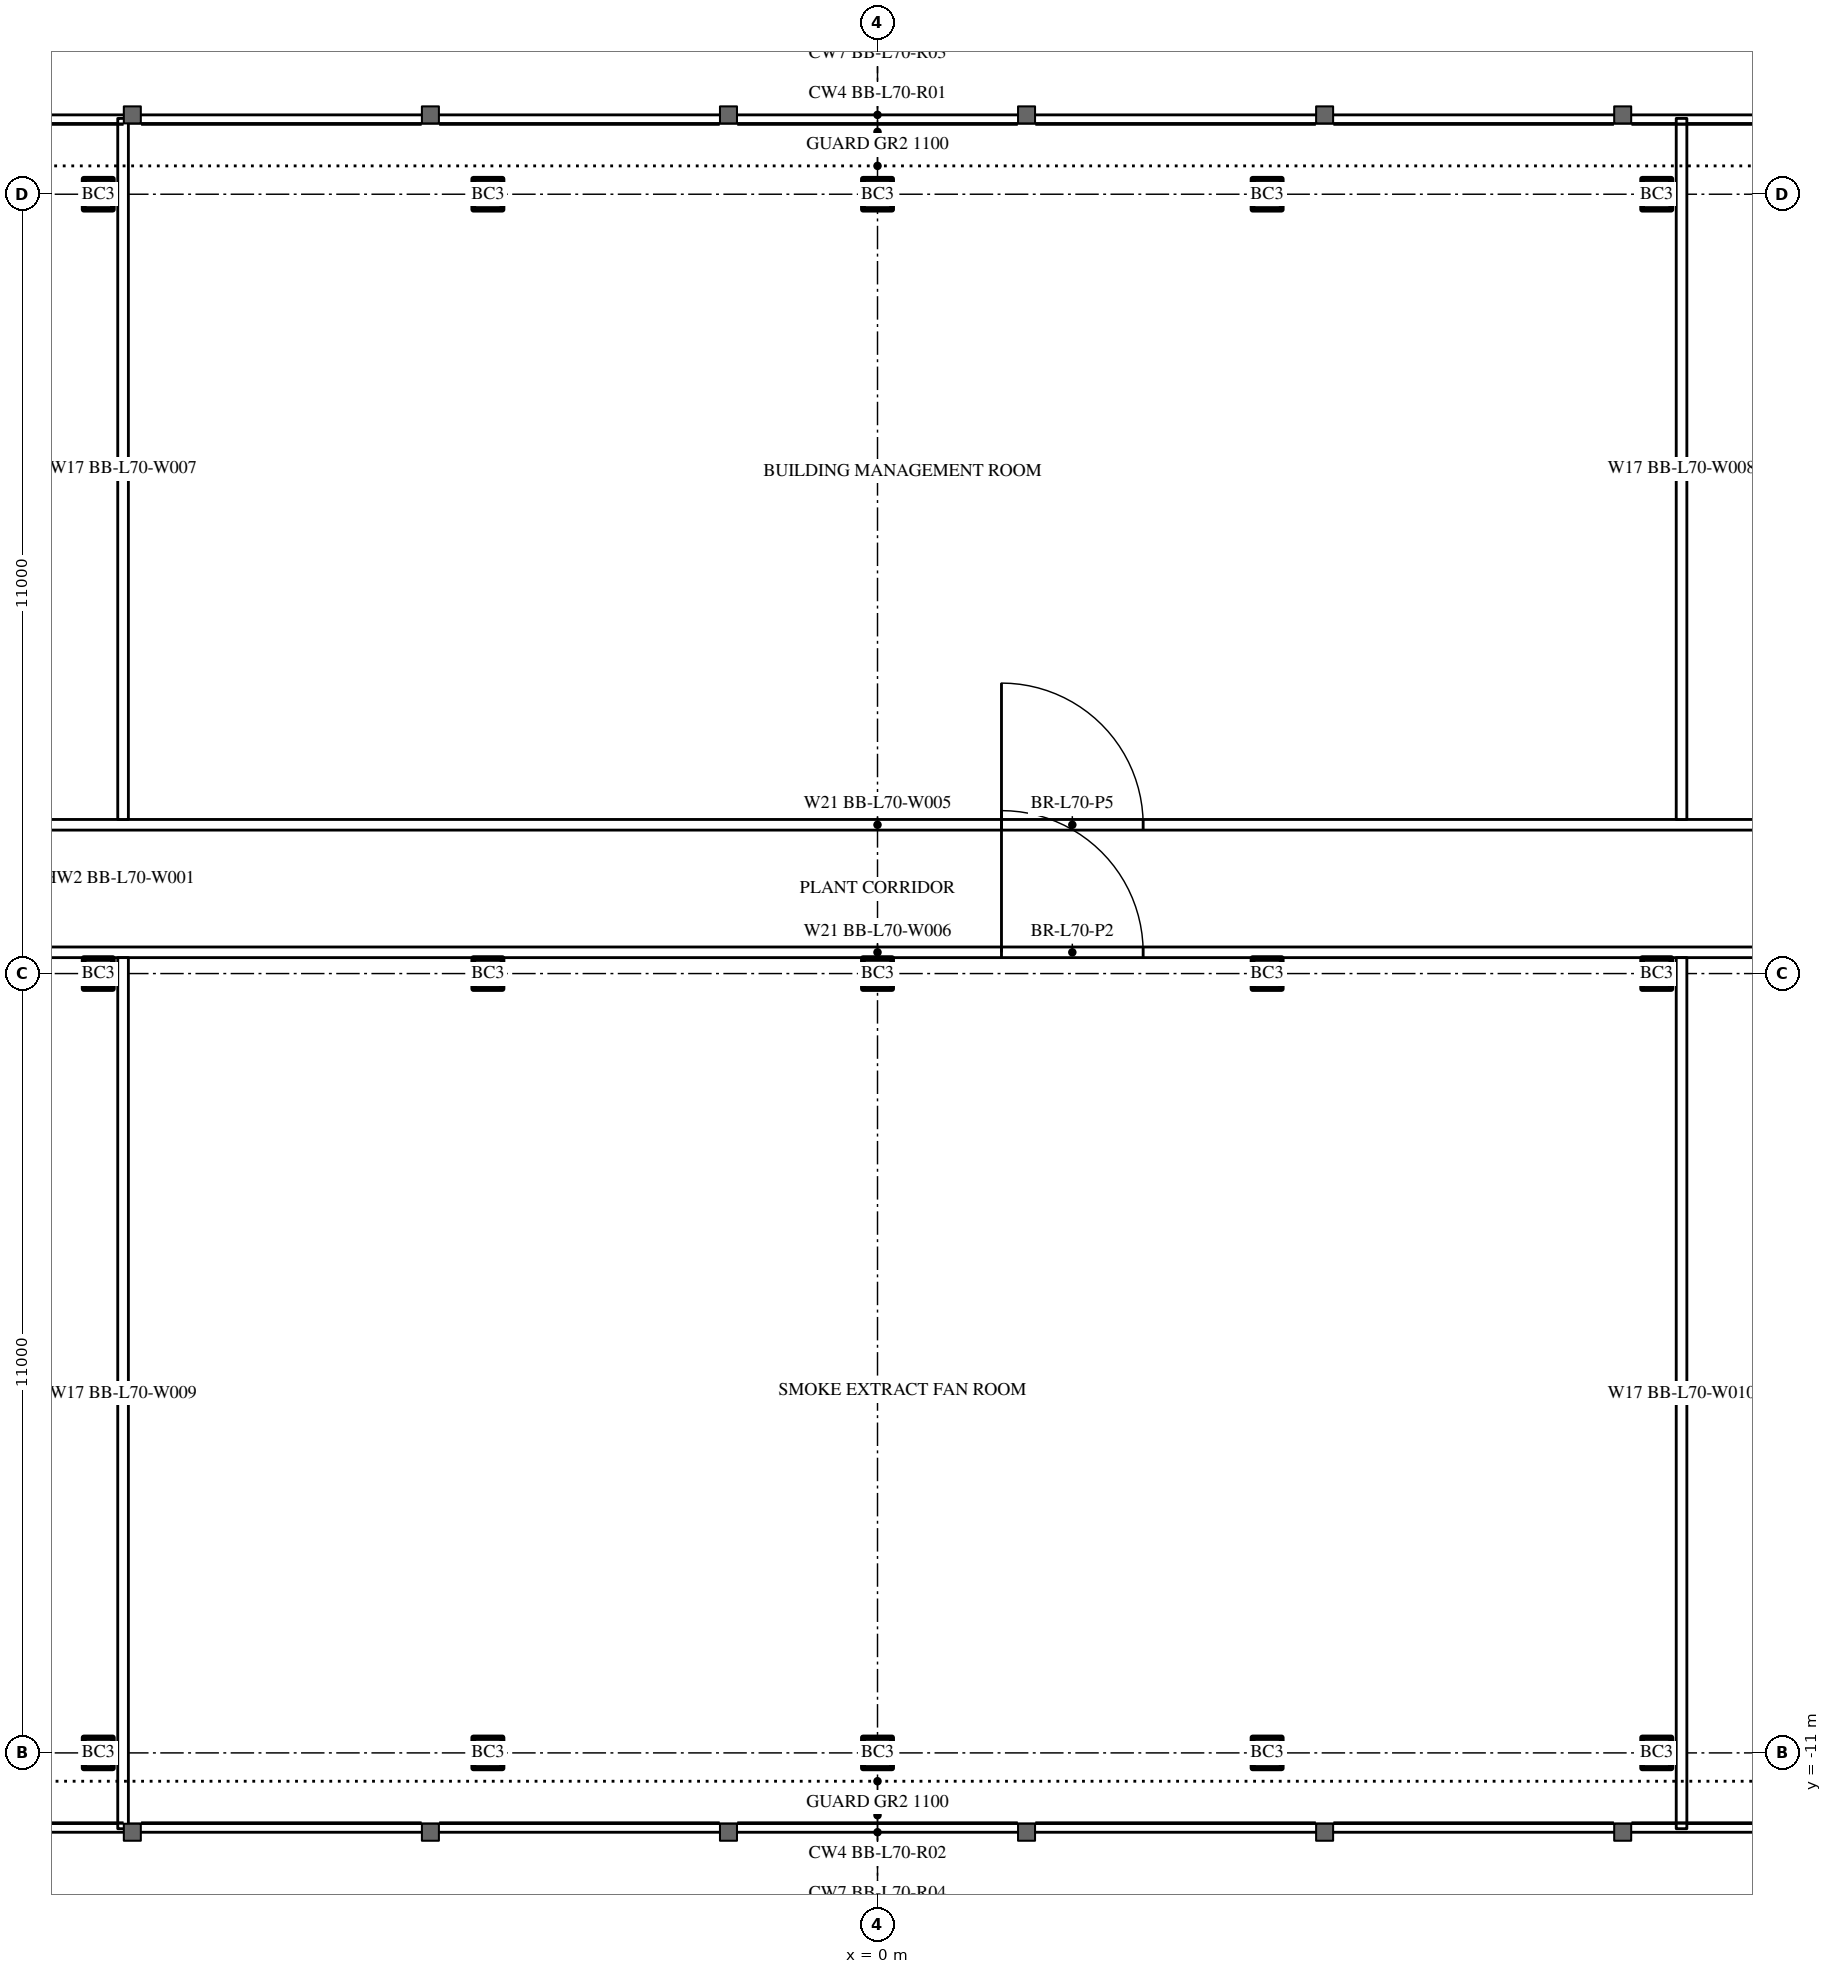
"""IFC4 building model, lengths in metres.
Left out: names, types, materials, properties, quantities, classifications, styles, units other than length and angle.
Written with IfcOpenShell. Run it as: python <this file> out.ifc"""

import sys

from ifc_helpers import new_model, si_unit, direction, frame, frame_2d, origin, origin_2d, place, context, subcontext, project, spatial, rectangle, i_section, extrude, element, fill, save


model = new_model("IFC4")
c1 = context("Model", 3, precision=1e-05, world=origin(), true_north=direction((0.0, 1.0)))
c2 = subcontext(c1, "Body", "Model", "MODEL_VIEW")
j1 = project(units=[si_unit("LENGTHUNIT", "METRE"), si_unit("PLANEANGLEUNIT", "RADIAN")], contexts=[c1])
p1 = place(None, origin())
s1 = spatial("IfcSite", under=j1, at=p1, CompositionType="ELEMENT")
p2 = place(p1, origin())
s2 = spatial("IfcBuilding", under=s1, at=p2, CompositionType="ELEMENT")
p3 = place(p2, frame((0.0, 0.0, 268.3)))
s3 = spatial("IfcBuildingStorey", under=s2, at=p3, CompositionType="ELEMENT", Elevation=268.3)
for number, where, z_axis, x_axis in (
    (1, (-11.0, -11.0, 0.0), (0.0, 0.0, 1.0), (1.0, 0.0, 0.0)),
    (2, (-5.5, -11.0, 0.0), (0.0, 0.0, 1.0), (1.0, 0.0, 0.0)),
    (3, (0.0, -11.0, 0.0), (0.0, 0.0, 1.0), (1.0, 0.0, 0.0)),
    (4, (5.5, -11.0, 0.0), (0.0, 0.0, 1.0), (1.0, 0.0, 0.0)),
    (5, (11.0, -11.0, 0.0), (0.0, 0.0, 1.0), (1.0, 0.0, 0.0)),
    (6, (-11.0, 0.0, 0.0), (0.0, 0.0, 1.0), (1.0, 0.0, 0.0)),
    (7, (-5.5, 0.0, 0.0), (0.0, 0.0, 1.0), (1.0, 0.0, 0.0)),
    (8, (0.0, 0.0, 0.0), (0.0, 0.0, 1.0), (1.0, 0.0, 0.0)),
    (9, (5.5, 0.0, 0.0), (0.0, 0.0, 1.0), (1.0, 0.0, 0.0)),
    (10, (11.0, 0.0, 0.0), (0.0, 0.0, 1.0), (1.0, 0.0, 0.0)),
    (11, (-11.0, 11.0, 0.0), (0.0, 0.0, 1.0), (1.0, 0.0, 0.0)),
    (12, (-5.5, 11.0, 0.0), (0.0, 0.0, 1.0), (1.0, 0.0, 0.0)),
    (13, (0.0, 11.0, 0.0), (0.0, 0.0, 1.0), (1.0, 0.0, 0.0)),
    (14, (5.5, 11.0, 0.0), (0.0, 0.0, 1.0), (1.0, 0.0, 0.0)),
    (15, (11.0, 11.0, 0.0), (0.0, 0.0, 1.0), (1.0, 0.0, 0.0)),
):
    element("IfcColumn", number, at=place(p3, frame(where, z_axis=z_axis, x_axis=x_axis)), inside=s3, PredefinedType="COLUMN", context=c2, shape_type="SweptSolid", body=[
        extrude(i_section(OverallWidth=0.412, OverallDepth=0.437, WebThickness=0.036, FlangeThickness=0.058, FilletRadius=0.015, at=origin_2d()), origin(), (0.0, 0.0, 1.0), 5.0),
    ])
p4 = place(p3, frame((-27.5, 0.3, 0.0), z_axis=(0.0, 0.0, 1.0), x_axis=(1.0, 0.0, 0.0)))
e16 = element("IfcWall", 16, at=p4, inside=s3, PredefinedType="PARTITIONING", context=c2, shape_type="SweptSolid", body=[
    extrude(rectangle(XDim=55.0, YDim=0.15, at=frame_2d((27.5, 0.0))), origin(), (0.0, 0.0, 1.0), 4.163),
])
p5 = place(p4, frame((7.25, 0.0, 0.0)))
e17 = element("IfcOpeningElement", 17, at=p5, cuts=e16, PredefinedType="OPENING", context=c2, shape_type="SweptSolid", body=[
    extrude(rectangle(XDim=2.0, YDim=2.4, at=frame_2d((1.0, 1.2))), frame((0.0, 0.085, 0.0), z_axis=(0.0, -1.0, 0.0), x_axis=(1.0, 0.0, 0.0)), (0.0, 0.0, 1.0), 0.17),
])
p6 = place(p4, frame((29.25, 0.0, 0.0)))
e18 = element("IfcOpeningElement", 18, at=p6, cuts=e16, PredefinedType="OPENING", context=c2, shape_type="SweptSolid", body=[
    extrude(rectangle(XDim=2.0, YDim=2.4, at=frame_2d((1.0, 1.2))), frame((0.0, 0.085, 0.0), z_axis=(0.0, -1.0, 0.0), x_axis=(1.0, 0.0, 0.0)), (0.0, 0.0, 1.0), 0.17),
])
p7 = place(p4, frame((45.75, 0.0, 0.0)))
e19 = element("IfcOpeningElement", 19, at=p7, cuts=e16, PredefinedType="OPENING", context=c2, shape_type="SweptSolid", body=[
    extrude(rectangle(XDim=2.0, YDim=2.4, at=frame_2d((1.0, 1.2))), frame((0.0, 0.085, 0.0), z_axis=(0.0, -1.0, 0.0), x_axis=(1.0, 0.0, 0.0)), (0.0, 0.0, 1.0), 0.17),
])
p8 = place(p3, frame((-27.5, 2.1, 0.0), z_axis=(0.0, 0.0, 1.0), x_axis=(1.0, 0.0, 0.0)))
e20 = element("IfcWall", 20, at=p8, inside=s3, PredefinedType="PARTITIONING", context=c2, shape_type="SweptSolid", body=[
    extrude(rectangle(XDim=55.0, YDim=0.15, at=frame_2d((27.5, 0.0))), origin(), (0.0, 0.0, 1.0), 4.7),
])
p9 = place(p8, frame((7.25, 0.0, 0.0)))
e21 = element("IfcOpeningElement", 21, at=p9, cuts=e20, PredefinedType="OPENING", context=c2, shape_type="SweptSolid", body=[
    extrude(rectangle(XDim=2.0, YDim=2.4, at=frame_2d((1.0, 1.2))), frame((0.0, 0.085, 0.0), z_axis=(0.0, -1.0, 0.0), x_axis=(1.0, 0.0, 0.0)), (0.0, 0.0, 1.0), 0.17),
])
p10 = place(p8, frame((29.25, 0.0, 0.0)))
e22 = element("IfcOpeningElement", 22, at=p10, cuts=e20, PredefinedType="OPENING", context=c2, shape_type="SweptSolid", body=[
    extrude(rectangle(XDim=2.0, YDim=2.4, at=frame_2d((1.0, 1.2))), frame((0.0, 0.085, 0.0), z_axis=(0.0, -1.0, 0.0), x_axis=(1.0, 0.0, 0.0)), (0.0, 0.0, 1.0), 0.17),
])
p11 = place(p8, frame((45.75, 0.0, 0.0)))
e23 = element("IfcOpeningElement", 23, at=p11, cuts=e20, PredefinedType="OPENING", context=c2, shape_type="SweptSolid", body=[
    extrude(rectangle(XDim=2.0, YDim=2.4, at=frame_2d((1.0, 1.2))), frame((0.0, 0.085, 0.0), z_axis=(0.0, -1.0, 0.0), x_axis=(1.0, 0.0, 0.0)), (0.0, 0.0, 1.0), 0.17),
])
for number, where, z_axis, x_axis in (
    (24, (-10.65, -12.07, 0.0), (0.0, 0.0, 1.0), (0.0, 1.0, 0.0)),
    (25, (11.35, -12.07, 0.0), (0.0, 0.0, 1.0), (0.0, 1.0, 0.0)),
):
    element("IfcWall", number, at=place(p3, frame(where, z_axis=z_axis, x_axis=x_axis)), inside=s3, PredefinedType="PARTITIONING", context=c2, shape_type="SweptSolid", body=[
        extrude(rectangle(XDim=12.295, YDim=0.15, at=frame_2d((6.147, 0.0))), origin(), (0.0, 0.0, 1.0), 4.7),
    ])
for number, where, z_axis, x_axis in (
    (26, (-10.65, 2.175, 0.0), (0.0, 0.0, 1.0), (0.0, 1.0, 0.0)),
    (27, (11.35, 2.175, 0.0), (0.0, 0.0, 1.0), (0.0, 1.0, 0.0)),
):
    element("IfcWall", number, at=place(p3, frame(where, z_axis=z_axis, x_axis=x_axis)), inside=s3, PredefinedType="PARTITIONING", context=c2, shape_type="SweptSolid", body=[
        extrude(rectangle(XDim=9.895, YDim=0.15, at=frame_2d((4.948, 0.0))), origin(), (0.0, 0.0, 1.0), 4.7),
    ])
p12 = place(p6, origin())
e28 = element("IfcDoor", 28, at=p12, inside=s3, OperationType="DOUBLE_DOOR_SINGLE_SWING", PredefinedType="DOOR", context=c2, shape_type="SweptSolid", body=[
    extrude(rectangle(XDim=2.0, YDim=2.4, at=frame_2d((1.0, 1.2))), frame((0.0, 0.025, 0.0), z_axis=(0.0, -1.0, 0.0), x_axis=(1.0, 0.0, 0.0)), (0.0, 0.0, 1.0), 0.05),
])
fill(e18, e28)
p13 = place(p10, origin())
e29 = element("IfcDoor", 29, at=p13, inside=s3, OperationType="DOUBLE_DOOR_SINGLE_SWING", PredefinedType="DOOR", context=c2, shape_type="SweptSolid", body=[
    extrude(rectangle(XDim=2.0, YDim=2.4, at=frame_2d((1.0, 1.2))), frame((0.0, 0.025, 0.0), z_axis=(0.0, -1.0, 0.0), x_axis=(1.0, 0.0, 0.0)), (0.0, 0.0, 1.0), 0.05),
])
fill(e22, e29)
save(model, sys.argv[1])
